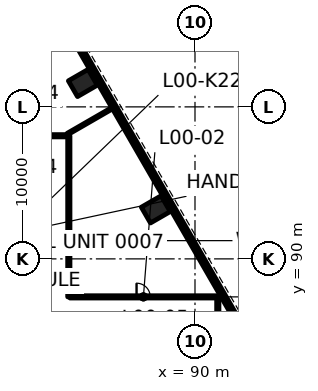
"""IFC4 building model, lengths in metres.
Left out: names, types, materials, properties, quantities, classifications, styles, units other than length and angle.
Written with IfcOpenShell. Run it as: python <this file> out.ifc"""

import sys

from ifc_helpers import new_model, si_unit, direction, frame, frame_2d, origin, origin_2d, place, context, subcontext, project, spatial, rectangle, extrude, element, fill, save


model = new_model("IFC4")
c1 = context("Model", 3, precision=1e-05, world=origin(), true_north=direction((0.0, 1.0)))
c2 = subcontext(c1, "Body", "Model", "MODEL_VIEW")
j1 = project(units=[si_unit("LENGTHUNIT", "METRE"), si_unit("PLANEANGLEUNIT", "RADIAN")], contexts=[c1])
p1 = place(None, origin())
s1 = spatial("IfcSite", under=j1, at=p1, CompositionType="ELEMENT")
p2 = place(p1, origin())
s2 = spatial("IfcBuilding", under=s1, at=p2, CompositionType="ELEMENT")
p3 = place(p2, origin())
s3 = spatial("IfcBuildingStorey", under=s2, at=p3, CompositionType="ELEMENT", Elevation=0.0)
for number, where, z_axis, x_axis in (
    (1, (87.421, 93.256, 0.0), (0.0, 0.0, 1.0), (-0.5, 0.866, 0.0)),
    (2, (82.621, 101.57, 0.0), (0.0, 0.0, 1.0), (-0.5, 0.866, 0.0)),
):
    element("IfcColumn", number, at=place(p3, frame(where, z_axis=z_axis, x_axis=x_axis)), inside=s3, PredefinedType="COLUMN", context=c2, shape_type="SweptSolid", body=[
        extrude(rectangle(XDim=1.2, YDim=1.5, at=origin_2d()), origin(), (0.0, 0.0, 1.0), 8.0),
    ])
p4 = place(p3, frame((81.775, 87.5, 0.0), z_axis=(0.0, 0.0, 1.0), x_axis=(1.0, 0.0, 0.0)))
e3 = element("IfcWall", 3, at=p4, inside=s3, PredefinedType="PARTITIONING", context=c2, shape_type="SweptSolid", body=[
    extrude(rectangle(XDim=9.662, YDim=0.15, at=frame_2d((4.831, 0.0))), origin(), (0.0, 0.0, 1.0), 6.865),
])
p5 = place(p4, frame((4.381, 0.0, 0.0)))
e4 = element("IfcOpeningElement", 4, at=p5, cuts=e3, PredefinedType="OPENING", context=c2, shape_type="SweptSolid", body=[
    extrude(rectangle(XDim=0.9, YDim=2.1, at=frame_2d((0.45, 1.05))), frame((0.0, 0.085, 0.0), z_axis=(0.0, -1.0, 0.0), x_axis=(1.0, 0.0, 0.0)), (0.0, 0.0, 1.0), 0.17),
])
p6 = place(p3, frame((75.975, 98.1, 0.0), z_axis=(0.0, 0.0, 1.0), x_axis=(1.0, 0.0, 0.0)))
e5 = element("IfcWall", 5, at=p6, inside=s3, PredefinedType="PARTITIONING", context=c2, shape_type="SweptSolid", body=[
    extrude(rectangle(XDim=5.649, YDim=0.15, at=frame_2d((2.825, 0.0))), origin(), (0.0, 0.0, 1.0), 7.1),
])
p7 = place(p6, frame((2.371, 0.0, 0.0)))
e6 = element("IfcOpeningElement", 6, at=p7, cuts=e5, PredefinedType="OPENING", context=c2, shape_type="SweptSolid", body=[
    extrude(rectangle(XDim=0.9, YDim=2.1, at=frame_2d((0.45, 1.05))), frame((0.0, 0.085, 0.0), z_axis=(0.0, -1.0, 0.0), x_axis=(1.0, 0.0, 0.0)), (0.0, 0.0, 1.0), 0.17),
])
p8 = place(p3, frame((81.61, 98.215, 0.0), z_axis=(0.0, 0.0, 1.0), x_axis=(0.866004935796, 0.50003544992, 0.0)))
e7 = element("IfcWall", 7, at=p8, inside=s3, PredefinedType="PARTITIONING", context=c2, shape_type="SweptSolid", body=[
    extrude(rectangle(XDim=3.511, YDim=0.1, at=frame_2d((1.755, 0.0))), origin(), (0.0, 0.0, 1.0), 6.865),
])
p9 = place(p3, frame((91.5, 85.219, 0.0), z_axis=(0.0, 0.0, 1.0), x_axis=(0.0, 1.0, 0.0)))
e8 = element("IfcWall", 8, at=p9, inside=s3, PredefinedType="PARTITIONING", context=c2, shape_type="SweptSolid", body=[
    extrude(rectangle(XDim=2.17, YDim=0.15, at=frame_2d((1.085, 0.0))), origin(), (0.0, 0.0, 1.0), 6.865),
])
p10 = place(p3, frame((81.7, 87.5, 0.0), z_axis=(0.0, 0.0, 1.0), x_axis=(0.0, 1.0, 0.0)))
e9 = element("IfcWall", 9, at=p10, inside=s3, PredefinedType="PARTITIONING", context=c2, shape_type="SweptSolid", body=[
    extrude(rectangle(XDim=10.6, YDim=0.15, at=frame_2d((5.3, 0.0))), origin(), (0.0, 0.0, 1.0), 7.1),
])
p11 = place(p3, frame((107.504, 60.451, 0.0), z_axis=(0.0, 0.0, 1.0), x_axis=(-0.500000550228, 0.86602508611, 0.0)))
e10 = element("IfcWall", 10, at=p11, inside=s3, PredefinedType="SOLIDWALL", context=c2, shape_type="SweptSolid", body=[
    extrude(rectangle(XDim=57.704, YDim=0.3, at=frame_2d((28.852, 0.0))), origin(), (0.0, 0.0, 1.0), 7.7),
])
p12 = place(p11, frame((56.104, 0.0, 0.0)))
e11 = element("IfcOpeningElement", 11, at=p12, cuts=e10, PredefinedType="OPENING", context=c2, shape_type="SweptSolid", body=[
    extrude(rectangle(XDim=1.2, YDim=2.4, at=frame_2d((0.6, 1.2))), frame((0.0, 0.16, 0.0), z_axis=(0.0, -1.0, 0.0), x_axis=(1.0, 0.0, 0.0)), (0.0, 0.0, 1.0), 0.32),
])
p13 = place(p11, frame((1.552, 0.0, 0.15)))
e12 = element("IfcOpeningElement", 12, at=p13, cuts=e10, PredefinedType="OPENING", context=c2, shape_type="SweptSolid", body=[
    extrude(rectangle(XDim=2.1, YDim=5.4, at=frame_2d((1.05, 2.7))), frame((0.0, 0.16, 0.0), z_axis=(0.0, -1.0, 0.0), x_axis=(1.0, 0.0, 0.0)), (0.0, 0.0, 1.0), 0.32),
])
p14 = place(p11, frame((4.052, 0.0, 0.15)))
e13 = element("IfcOpeningElement", 13, at=p14, cuts=e10, PredefinedType="OPENING", context=c2, shape_type="SweptSolid", body=[
    extrude(rectangle(XDim=2.1, YDim=5.4, at=frame_2d((1.05, 2.7))), frame((0.0, 0.16, 0.0), z_axis=(0.0, -1.0, 0.0), x_axis=(1.0, 0.0, 0.0)), (0.0, 0.0, 1.0), 0.32),
])
p15 = place(p11, frame((6.552, 0.0, 0.15)))
e14 = element("IfcOpeningElement", 14, at=p15, cuts=e10, PredefinedType="OPENING", context=c2, shape_type="SweptSolid", body=[
    extrude(rectangle(XDim=2.1, YDim=5.4, at=frame_2d((1.05, 2.7))), frame((0.0, 0.16, 0.0), z_axis=(0.0, -1.0, 0.0), x_axis=(1.0, 0.0, 0.0)), (0.0, 0.0, 1.0), 0.32),
])
p16 = place(p11, frame((9.052, 0.0, 0.15)))
e15 = element("IfcOpeningElement", 15, at=p16, cuts=e10, PredefinedType="OPENING", context=c2, shape_type="SweptSolid", body=[
    extrude(rectangle(XDim=2.1, YDim=5.4, at=frame_2d((1.05, 2.7))), frame((0.0, 0.16, 0.0), z_axis=(0.0, -1.0, 0.0), x_axis=(1.0, 0.0, 0.0)), (0.0, 0.0, 1.0), 0.32),
])
p17 = place(p11, frame((11.552, 0.0, 0.15)))
e16 = element("IfcOpeningElement", 16, at=p17, cuts=e10, PredefinedType="OPENING", context=c2, shape_type="SweptSolid", body=[
    extrude(rectangle(XDim=2.1, YDim=5.4, at=frame_2d((1.05, 2.7))), frame((0.0, 0.16, 0.0), z_axis=(0.0, -1.0, 0.0), x_axis=(1.0, 0.0, 0.0)), (0.0, 0.0, 1.0), 0.32),
])
p18 = place(p11, frame((14.052, 0.0, 0.15)))
e17 = element("IfcOpeningElement", 17, at=p18, cuts=e10, PredefinedType="OPENING", context=c2, shape_type="SweptSolid", body=[
    extrude(rectangle(XDim=2.1, YDim=5.4, at=frame_2d((1.05, 2.7))), frame((0.0, 0.16, 0.0), z_axis=(0.0, -1.0, 0.0), x_axis=(1.0, 0.0, 0.0)), (0.0, 0.0, 1.0), 0.32),
])
p19 = place(p11, frame((16.552, 0.0, 0.15)))
e18 = element("IfcOpeningElement", 18, at=p19, cuts=e10, PredefinedType="OPENING", context=c2, shape_type="SweptSolid", body=[
    extrude(rectangle(XDim=2.1, YDim=5.4, at=frame_2d((1.05, 2.7))), frame((0.0, 0.16, 0.0), z_axis=(0.0, -1.0, 0.0), x_axis=(1.0, 0.0, 0.0)), (0.0, 0.0, 1.0), 0.32),
])
p20 = place(p11, frame((19.052, 0.0, 0.15)))
e19 = element("IfcOpeningElement", 19, at=p20, cuts=e10, PredefinedType="OPENING", context=c2, shape_type="SweptSolid", body=[
    extrude(rectangle(XDim=2.1, YDim=5.4, at=frame_2d((1.05, 2.7))), frame((0.0, 0.16, 0.0), z_axis=(0.0, -1.0, 0.0), x_axis=(1.0, 0.0, 0.0)), (0.0, 0.0, 1.0), 0.32),
])
p21 = place(p11, frame((21.552, 0.0, 0.15)))
e20 = element("IfcOpeningElement", 20, at=p21, cuts=e10, PredefinedType="OPENING", context=c2, shape_type="SweptSolid", body=[
    extrude(rectangle(XDim=2.1, YDim=5.4, at=frame_2d((1.05, 2.7))), frame((0.0, 0.16, 0.0), z_axis=(0.0, -1.0, 0.0), x_axis=(1.0, 0.0, 0.0)), (0.0, 0.0, 1.0), 0.32),
])
p22 = place(p11, frame((24.052, 0.0, 0.15)))
e21 = element("IfcOpeningElement", 21, at=p22, cuts=e10, PredefinedType="OPENING", context=c2, shape_type="SweptSolid", body=[
    extrude(rectangle(XDim=2.1, YDim=5.4, at=frame_2d((1.05, 2.7))), frame((0.0, 0.16, 0.0), z_axis=(0.0, -1.0, 0.0), x_axis=(1.0, 0.0, 0.0)), (0.0, 0.0, 1.0), 0.32),
])
p23 = place(p11, frame((26.552, 0.0, 0.15)))
e22 = element("IfcOpeningElement", 22, at=p23, cuts=e10, PredefinedType="OPENING", context=c2, shape_type="SweptSolid", body=[
    extrude(rectangle(XDim=2.1, YDim=5.4, at=frame_2d((1.05, 2.7))), frame((0.0, 0.16, 0.0), z_axis=(0.0, -1.0, 0.0), x_axis=(1.0, 0.0, 0.0)), (0.0, 0.0, 1.0), 0.32),
])
p24 = place(p11, frame((29.052, 0.0, 0.15)))
e23 = element("IfcOpeningElement", 23, at=p24, cuts=e10, PredefinedType="OPENING", context=c2, shape_type="SweptSolid", body=[
    extrude(rectangle(XDim=2.1, YDim=5.4, at=frame_2d((1.05, 2.7))), frame((0.0, 0.16, 0.0), z_axis=(0.0, -1.0, 0.0), x_axis=(1.0, 0.0, 0.0)), (0.0, 0.0, 1.0), 0.32),
])
p25 = place(p11, frame((31.552, 0.0, 0.15)))
e24 = element("IfcOpeningElement", 24, at=p25, cuts=e10, PredefinedType="OPENING", context=c2, shape_type="SweptSolid", body=[
    extrude(rectangle(XDim=2.1, YDim=5.4, at=frame_2d((1.05, 2.7))), frame((0.0, 0.16, 0.0), z_axis=(0.0, -1.0, 0.0), x_axis=(1.0, 0.0, 0.0)), (0.0, 0.0, 1.0), 0.32),
])
p26 = place(p11, frame((34.052, 0.0, 0.15)))
e25 = element("IfcOpeningElement", 25, at=p26, cuts=e10, PredefinedType="OPENING", context=c2, shape_type="SweptSolid", body=[
    extrude(rectangle(XDim=2.1, YDim=5.4, at=frame_2d((1.05, 2.7))), frame((0.0, 0.16, 0.0), z_axis=(0.0, -1.0, 0.0), x_axis=(1.0, 0.0, 0.0)), (0.0, 0.0, 1.0), 0.32),
])
p27 = place(p11, frame((36.552, 0.0, 0.15)))
e26 = element("IfcOpeningElement", 26, at=p27, cuts=e10, PredefinedType="OPENING", context=c2, shape_type="SweptSolid", body=[
    extrude(rectangle(XDim=2.1, YDim=5.4, at=frame_2d((1.05, 2.7))), frame((0.0, 0.16, 0.0), z_axis=(0.0, -1.0, 0.0), x_axis=(1.0, 0.0, 0.0)), (0.0, 0.0, 1.0), 0.32),
])
p28 = place(p11, frame((39.052, 0.0, 0.15)))
e27 = element("IfcOpeningElement", 27, at=p28, cuts=e10, PredefinedType="OPENING", context=c2, shape_type="SweptSolid", body=[
    extrude(rectangle(XDim=2.1, YDim=5.4, at=frame_2d((1.05, 2.7))), frame((0.0, 0.16, 0.0), z_axis=(0.0, -1.0, 0.0), x_axis=(1.0, 0.0, 0.0)), (0.0, 0.0, 1.0), 0.32),
])
p29 = place(p11, frame((41.552, 0.0, 0.15)))
e28 = element("IfcOpeningElement", 28, at=p29, cuts=e10, PredefinedType="OPENING", context=c2, shape_type="SweptSolid", body=[
    extrude(rectangle(XDim=2.1, YDim=5.4, at=frame_2d((1.05, 2.7))), frame((0.0, 0.16, 0.0), z_axis=(0.0, -1.0, 0.0), x_axis=(1.0, 0.0, 0.0)), (0.0, 0.0, 1.0), 0.32),
])
p30 = place(p11, frame((44.052, 0.0, 0.15)))
e29 = element("IfcOpeningElement", 29, at=p30, cuts=e10, PredefinedType="OPENING", context=c2, shape_type="SweptSolid", body=[
    extrude(rectangle(XDim=2.1, YDim=5.4, at=frame_2d((1.05, 2.7))), frame((0.0, 0.16, 0.0), z_axis=(0.0, -1.0, 0.0), x_axis=(1.0, 0.0, 0.0)), (0.0, 0.0, 1.0), 0.32),
])
p31 = place(p11, frame((46.552, 0.0, 0.15)))
e30 = element("IfcOpeningElement", 30, at=p31, cuts=e10, PredefinedType="OPENING", context=c2, shape_type="SweptSolid", body=[
    extrude(rectangle(XDim=2.1, YDim=5.4, at=frame_2d((1.05, 2.7))), frame((0.0, 0.16, 0.0), z_axis=(0.0, -1.0, 0.0), x_axis=(1.0, 0.0, 0.0)), (0.0, 0.0, 1.0), 0.32),
])
p32 = place(p11, frame((49.052, 0.0, 0.15)))
e31 = element("IfcOpeningElement", 31, at=p32, cuts=e10, PredefinedType="OPENING", context=c2, shape_type="SweptSolid", body=[
    extrude(rectangle(XDim=2.1, YDim=5.4, at=frame_2d((1.05, 2.7))), frame((0.0, 0.16, 0.0), z_axis=(0.0, -1.0, 0.0), x_axis=(1.0, 0.0, 0.0)), (0.0, 0.0, 1.0), 0.32),
])
p33 = place(p11, frame((51.552, 0.0, 0.15)))
e32 = element("IfcOpeningElement", 32, at=p33, cuts=e10, PredefinedType="OPENING", context=c2, shape_type="SweptSolid", body=[
    extrude(rectangle(XDim=2.1, YDim=5.4, at=frame_2d((1.05, 2.7))), frame((0.0, 0.16, 0.0), z_axis=(0.0, -1.0, 0.0), x_axis=(1.0, 0.0, 0.0)), (0.0, 0.0, 1.0), 0.32),
])
p34 = place(p3, frame((107.106, 62.36, 0.0), z_axis=(0.0, 0.0, 1.0), x_axis=(-0.49999992739, 0.866025445706, 0.0)))
e33 = element("IfcWall", 33, at=p34, inside=s3, PredefinedType="SOLIDWALL", context=c2, shape_type="SweptSolid", body=[
    extrude(rectangle(XDim=54.0, YDim=0.4, at=frame_2d((27.0, 0.0))), origin(), (0.0, 0.0, 1.0), 7.64),
])
p35 = place(p3, frame((87.635, 102.635, 0.0), z_axis=(0.0, 0.0, 1.0), x_axis=(-0.499994616197, 0.866028512102, 0.0)))
e34 = element("IfcWall", 34, at=p35, inside=s3, PredefinedType="SOLIDWALL", context=c2, shape_type="SweptSolid", body=[
    extrude(rectangle(XDim=9.085, YDim=0.25, at=frame_2d((4.542, 0.0))), origin(), (0.0, 0.0, 1.0), 7.64),
])
p36 = place(p35, frame((7.885, 0.0, 0.0)))
e35 = element("IfcOpeningElement", 35, at=p36, cuts=e34, PredefinedType="OPENING", context=c2, shape_type="SweptSolid", body=[
    extrude(rectangle(XDim=1.0, YDim=2.1, at=frame_2d((0.5, 1.05))), frame((0.0, 0.135, 0.0), z_axis=(0.0, -1.0, 0.0), x_axis=(1.0, 0.0, 0.0)), (0.0, 0.0, 1.0), 0.27),
])
p37 = place(p3, frame((94.93, 90.0, 0.0), z_axis=(0.0, 0.0, 1.0), x_axis=(-0.499997667785, 0.866026750285, 0.0)))
e36 = element("IfcWall", 36, at=p37, inside=s3, PredefinedType="PARTITIONING", context=c2, shape_type="SweptSolid", body=[
    extrude(rectangle(XDim=14.59, YDim=0.2, at=frame_2d((7.295, 0.0))), origin(), (0.0, 0.0, 1.0), 7.64),
])
p38 = place(p37, frame((1.235, 0.0, 0.0)))
e37 = element("IfcOpeningElement", 37, at=p38, cuts=e36, PredefinedType="OPENING", context=c2, shape_type="SweptSolid", body=[
    extrude(rectangle(XDim=1.0, YDim=2.1, at=frame_2d((0.5, 1.05))), frame((0.0, 0.11, 0.0), z_axis=(0.0, -1.0, 0.0), x_axis=(1.0, 0.0, 0.0)), (0.0, 0.0, 1.0), 0.22),
])
p39 = place(p37, frame((4.275, 0.0, 0.0)))
e38 = element("IfcOpeningElement", 38, at=p39, cuts=e36, PredefinedType="OPENING", context=c2, shape_type="SweptSolid", body=[
    extrude(rectangle(XDim=0.9, YDim=2.1, at=frame_2d((0.45, 1.05))), frame((0.0, 0.11, 0.0), z_axis=(0.0, -1.0, 0.0), x_axis=(1.0, 0.0, 0.0)), (0.0, 0.0, 1.0), 0.22),
])
p40 = place(p37, frame((9.825, 0.0, 0.0)))
e39 = element("IfcOpeningElement", 39, at=p40, cuts=e36, PredefinedType="OPENING", context=c2, shape_type="SweptSolid", body=[
    extrude(rectangle(XDim=0.9, YDim=2.1, at=frame_2d((0.45, 1.05))), frame((0.0, 0.11, 0.0), z_axis=(0.0, -1.0, 0.0), x_axis=(1.0, 0.0, 0.0)), (0.0, 0.0, 1.0), 0.22),
])
p41 = place(p3, frame((92.267, 88.462, 0.0), z_axis=(0.0, 0.0, 1.0), x_axis=(0.866024349092, 0.500001826776, 0.0)))
e40 = element("IfcWall", 40, at=p41, inside=s3, PredefinedType="SOLIDWALL", context=c2, shape_type="SweptSolid", body=[
    extrude(rectangle(XDim=2.95, YDim=0.25, at=frame_2d((1.475, 0.0))), origin(), (0.0, 0.0, 1.0), 7.64),
])
for number, where, z_axis, x_axis in (
    (41, (90.529, 91.471, 0.0), (0.0, 0.0, 1.0), (0.866, 0.5, 0.0)),
    (42, (89.279, 93.636, 0.0), (0.0, 0.0, 1.0), (0.866, 0.5, 0.0)),
):
    element("IfcWall", number, at=place(p3, frame(where, z_axis=z_axis, x_axis=x_axis)), inside=s3, PredefinedType="PARTITIONING", context=c2, shape_type="SweptSolid", body=[
        extrude(rectangle(XDim=2.975, YDim=0.15, at=frame_2d((1.488, 0.0))), origin(), (0.0, 0.0, 1.0), 7.64),
    ])
p42 = place(p3, frame((84.972, 101.097, 0.0), z_axis=(0.0, 0.0, 1.0), x_axis=(0.866039495442, 0.49997559174, 0.0)))
e43 = element("IfcWall", 43, at=p42, inside=s3, PredefinedType="SOLIDWALL", context=c2, shape_type="SweptSolid", body=[
    extrude(rectangle(XDim=2.95, YDim=0.25, at=frame_2d((1.475, 0.0))), origin(), (0.0, 0.0, 1.0), 7.64),
])
p43 = place(p3, frame((112.456, 65.794, 0.0), z_axis=(0.0, 0.0, 1.0), x_axis=(-0.499998559706, 0.866026235337, 0.0)))
e44 = element("IfcWall", 44, at=p43, inside=s3, PredefinedType="PARTITIONING", context=c2, shape_type="SweptSolid", body=[
    extrude(rectangle(XDim=53.4, YDim=0.2, at=frame_2d((26.7, 0.0))), origin(), (0.0, 0.0, 1.0), 7.64),
])
p44 = place(p43, frame((12.6, 0.0, 0.0)))
e45 = element("IfcOpeningElement", 45, at=p44, cuts=e44, PredefinedType="OPENING", context=c2, shape_type="SweptSolid", body=[
    extrude(rectangle(XDim=1.8, YDim=2.1, at=frame_2d((0.9, 1.05))), frame((0.0, 0.11, 0.0), z_axis=(0.0, -1.0, 0.0), x_axis=(1.0, 0.0, 0.0)), (0.0, 0.0, 1.0), 0.22),
])
p45 = place(p43, frame((25.8, 0.0, 0.0)))
e46 = element("IfcOpeningElement", 46, at=p45, cuts=e44, PredefinedType="OPENING", context=c2, shape_type="SweptSolid", body=[
    extrude(rectangle(XDim=1.8, YDim=2.1, at=frame_2d((0.9, 1.05))), frame((0.0, 0.11, 0.0), z_axis=(0.0, -1.0, 0.0), x_axis=(1.0, 0.0, 0.0)), (0.0, 0.0, 1.0), 0.22),
])
p46 = place(p43, frame((35.0, 0.0, 0.0)))
e47 = element("IfcOpeningElement", 47, at=p46, cuts=e44, PredefinedType="OPENING", context=c2, shape_type="SweptSolid", body=[
    extrude(rectangle(XDim=1.0, YDim=2.1, at=frame_2d((0.5, 1.05))), frame((0.0, 0.11, 0.0), z_axis=(0.0, -1.0, 0.0), x_axis=(1.0, 0.0, 0.0)), (0.0, 0.0, 1.0), 0.22),
])
p47 = place(p43, frame((45.75, 0.0, 0.0)))
e48 = element("IfcOpeningElement", 48, at=p47, cuts=e44, PredefinedType="OPENING", context=c2, shape_type="SweptSolid", body=[
    extrude(rectangle(XDim=1.8, YDim=2.1, at=frame_2d((0.9, 1.05))), frame((0.0, 0.11, 0.0), z_axis=(0.0, -1.0, 0.0), x_axis=(1.0, 0.0, 0.0)), (0.0, 0.0, 1.0), 0.22),
])
p48 = place(p3, frame((92.592, 100.399, 0.0), z_axis=(0.0, 0.0, 1.0), x_axis=(0.866022961126, 0.500004230785, 0.0)))
e49 = element("IfcWall", 49, at=p48, inside=s3, PredefinedType="PARTITIONING", context=c2, shape_type="SweptSolid", body=[
    extrude(rectangle(XDim=23.05, YDim=0.15, at=frame_2d((11.525, 0.0))), origin(), (0.0, 0.0, 1.0), 7.64),
])
p49 = place(p3, frame((96.885, 102.964, 0.0), z_axis=(0.0, 0.0, 1.0), x_axis=(-0.500013677766, 0.866017506779, 0.0)))
e50 = element("IfcWall", 50, at=p49, inside=s3, PredefinedType="PARTITIONING", context=c2, shape_type="SweptSolid", body=[
    extrude(rectangle(XDim=13.425, YDim=0.15, at=frame_2d((6.712, 0.0))), origin(), (0.0, 0.0, 1.0), 7.64),
])
p50 = place(p49, frame((2.325, 0.0, 0.0)))
e51 = element("IfcOpeningElement", 51, at=p50, cuts=e50, PredefinedType="OPENING", context=c2, shape_type="SweptSolid", body=[
    extrude(rectangle(XDim=1.8, YDim=2.1, at=frame_2d((0.9, 1.05))), frame((0.0, 0.085, 0.0), z_axis=(0.0, -1.0, 0.0), x_axis=(1.0, 0.0, 0.0)), (0.0, 0.0, 1.0), 0.17),
])
p51 = place(p49, frame((9.325, 0.0, 0.0)))
e52 = element("IfcOpeningElement", 52, at=p51, cuts=e50, PredefinedType="OPENING", context=c2, shape_type="SweptSolid", body=[
    extrude(rectangle(XDim=1.8, YDim=2.1, at=frame_2d((0.9, 1.05))), frame((0.0, 0.085, 0.0), z_axis=(0.0, -1.0, 0.0), x_axis=(1.0, 0.0, 0.0)), (0.0, 0.0, 1.0), 0.17),
])
p52 = place(p5, origin())
e53 = element("IfcDoor", 53, at=p52, inside=s3, OperationType="SINGLE_SWING_RIGHT", PredefinedType="DOOR", context=c2, shape_type="SweptSolid", body=[
    extrude(rectangle(XDim=0.9, YDim=2.1, at=frame_2d((0.45, 1.05))), frame((0.0, 0.025, 0.0), z_axis=(0.0, -1.0, 0.0), x_axis=(1.0, 0.0, 0.0)), (0.0, 0.0, 1.0), 0.05),
])
fill(e4, e53)
p53 = place(p24, origin())
e54 = element("IfcWindow", 54, at=p53, inside=s3, PartitioningType="SINGLE_PANEL", PredefinedType="WINDOW", context=c2, shape_type="SweptSolid", body=[
    extrude(rectangle(XDim=2.1, YDim=5.4, at=frame_2d((1.05, 2.7))), frame((0.0, 0.03, 0.0), z_axis=(0.0, -1.0, 0.0), x_axis=(1.0, 0.0, 0.0)), (0.0, 0.0, 1.0), 0.06),
])
fill(e23, e54)
p54 = place(p25, origin())
e55 = element("IfcWindow", 55, at=p54, inside=s3, PartitioningType="SINGLE_PANEL", PredefinedType="WINDOW", context=c2, shape_type="SweptSolid", body=[
    extrude(rectangle(XDim=2.1, YDim=5.4, at=frame_2d((1.05, 2.7))), frame((0.0, 0.03, 0.0), z_axis=(0.0, -1.0, 0.0), x_axis=(1.0, 0.0, 0.0)), (0.0, 0.0, 1.0), 0.06),
])
fill(e24, e55)
p55 = place(p26, origin())
e56 = element("IfcWindow", 56, at=p55, inside=s3, PartitioningType="SINGLE_PANEL", PredefinedType="WINDOW", context=c2, shape_type="SweptSolid", body=[
    extrude(rectangle(XDim=2.1, YDim=5.4, at=frame_2d((1.05, 2.7))), frame((0.0, 0.03, 0.0), z_axis=(0.0, -1.0, 0.0), x_axis=(1.0, 0.0, 0.0)), (0.0, 0.0, 1.0), 0.06),
])
fill(e25, e56)
p56 = place(p27, origin())
e57 = element("IfcWindow", 57, at=p56, inside=s3, PartitioningType="SINGLE_PANEL", PredefinedType="WINDOW", context=c2, shape_type="SweptSolid", body=[
    extrude(rectangle(XDim=2.1, YDim=5.4, at=frame_2d((1.05, 2.7))), frame((0.0, 0.03, 0.0), z_axis=(0.0, -1.0, 0.0), x_axis=(1.0, 0.0, 0.0)), (0.0, 0.0, 1.0), 0.06),
])
fill(e26, e57)
p57 = place(p28, origin())
e58 = element("IfcWindow", 58, at=p57, inside=s3, PartitioningType="SINGLE_PANEL", PredefinedType="WINDOW", context=c2, shape_type="SweptSolid", body=[
    extrude(rectangle(XDim=2.1, YDim=5.4, at=frame_2d((1.05, 2.7))), frame((0.0, 0.03, 0.0), z_axis=(0.0, -1.0, 0.0), x_axis=(1.0, 0.0, 0.0)), (0.0, 0.0, 1.0), 0.06),
])
fill(e27, e58)
p58 = place(p29, origin())
e59 = element("IfcWindow", 59, at=p58, inside=s3, PartitioningType="SINGLE_PANEL", PredefinedType="WINDOW", context=c2, shape_type="SweptSolid", body=[
    extrude(rectangle(XDim=2.1, YDim=5.4, at=frame_2d((1.05, 2.7))), frame((0.0, 0.03, 0.0), z_axis=(0.0, -1.0, 0.0), x_axis=(1.0, 0.0, 0.0)), (0.0, 0.0, 1.0), 0.06),
])
fill(e28, e59)
p59 = place(p30, origin())
e60 = element("IfcWindow", 60, at=p59, inside=s3, PartitioningType="SINGLE_PANEL", PredefinedType="WINDOW", context=c2, shape_type="SweptSolid", body=[
    extrude(rectangle(XDim=2.1, YDim=5.4, at=frame_2d((1.05, 2.7))), frame((0.0, 0.03, 0.0), z_axis=(0.0, -1.0, 0.0), x_axis=(1.0, 0.0, 0.0)), (0.0, 0.0, 1.0), 0.06),
])
fill(e29, e60)
p60 = place(p31, origin())
e61 = element("IfcWindow", 61, at=p60, inside=s3, PartitioningType="SINGLE_PANEL", PredefinedType="WINDOW", context=c2, shape_type="SweptSolid", body=[
    extrude(rectangle(XDim=2.1, YDim=5.4, at=frame_2d((1.05, 2.7))), frame((0.0, 0.03, 0.0), z_axis=(0.0, -1.0, 0.0), x_axis=(1.0, 0.0, 0.0)), (0.0, 0.0, 1.0), 0.06),
])
fill(e30, e61)
p61 = place(p32, origin())
e62 = element("IfcWindow", 62, at=p61, inside=s3, PartitioningType="SINGLE_PANEL", PredefinedType="WINDOW", context=c2, shape_type="SweptSolid", body=[
    extrude(rectangle(XDim=2.1, YDim=5.4, at=frame_2d((1.05, 2.7))), frame((0.0, 0.03, 0.0), z_axis=(0.0, -1.0, 0.0), x_axis=(1.0, 0.0, 0.0)), (0.0, 0.0, 1.0), 0.06),
])
fill(e31, e62)
p62 = place(p39, origin())
e63 = element("IfcDoor", 63, at=p62, inside=s3, OperationType="SINGLE_SWING_RIGHT", PredefinedType="DOOR", context=c2, shape_type="SweptSolid", body=[
    extrude(rectangle(XDim=0.9, YDim=2.1, at=frame_2d((0.45, 1.05))), frame((0.0, 0.025, 0.0), z_axis=(0.0, -1.0, 0.0), x_axis=(1.0, 0.0, 0.0)), (0.0, 0.0, 1.0), 0.05),
])
fill(e38, e63)
p63 = place(p40, origin())
e64 = element("IfcDoor", 64, at=p63, inside=s3, OperationType="SINGLE_SWING_RIGHT", PredefinedType="DOOR", context=c2, shape_type="SweptSolid", body=[
    extrude(rectangle(XDim=0.9, YDim=2.1, at=frame_2d((0.45, 1.05))), frame((0.0, 0.025, 0.0), z_axis=(0.0, -1.0, 0.0), x_axis=(1.0, 0.0, 0.0)), (0.0, 0.0, 1.0), 0.05),
])
fill(e39, e64)
save(model, sys.argv[1])
